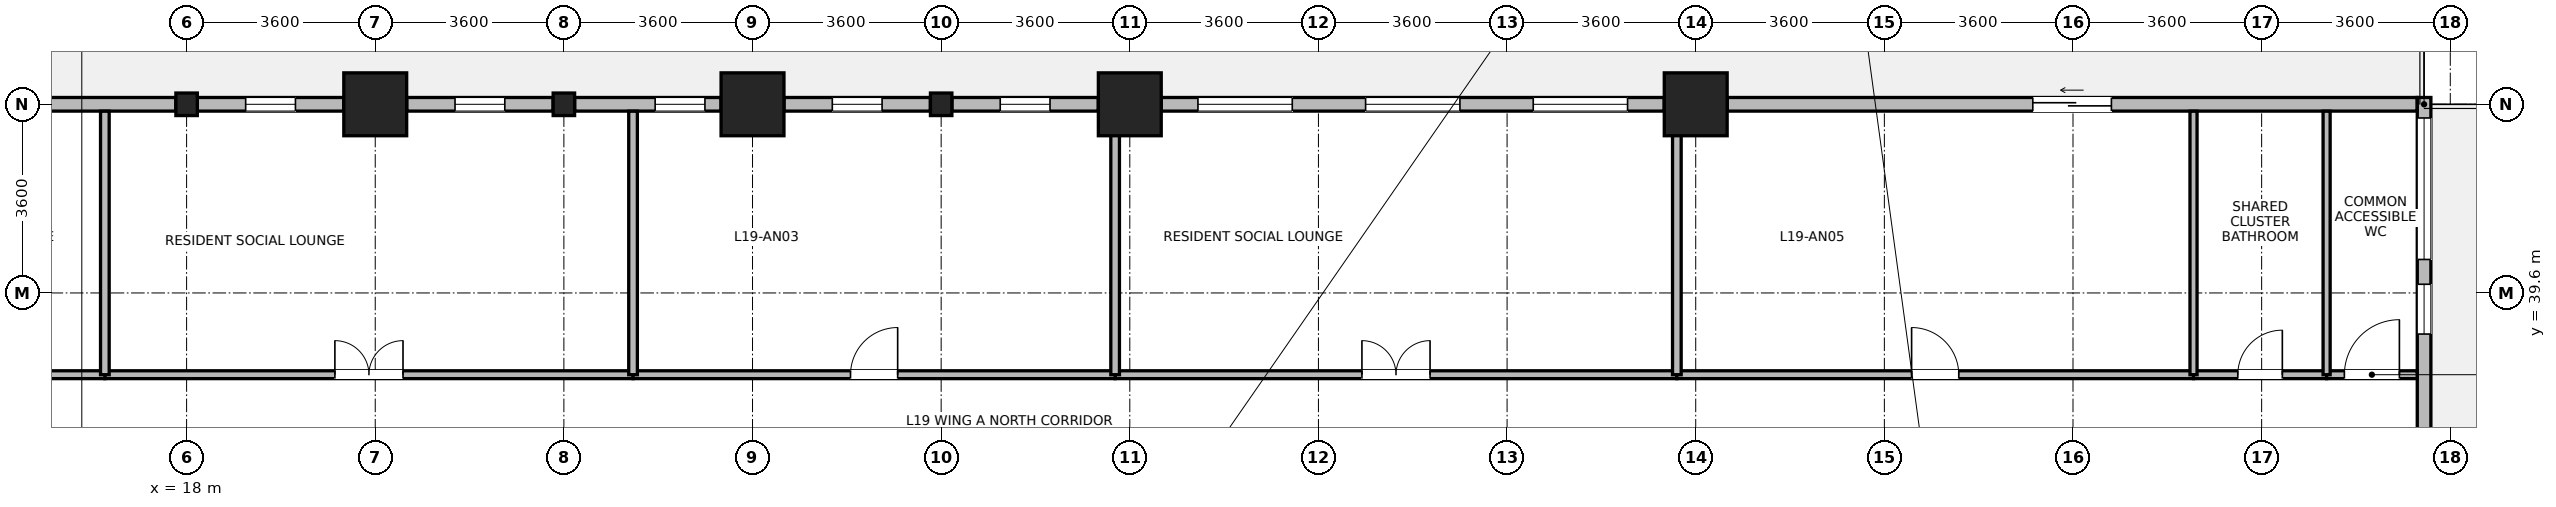
"""IFC4 building model, lengths in metres.
Left out: names, types, materials, properties, quantities, classifications, styles, units other than length and angle.
Written with IfcOpenShell. Run it as: python <this file> out.ifc"""

import sys

from ifc_helpers import new_model, si_unit, direction, frame, frame_2d, origin, origin_2d, place, context, subcontext, project, spatial, rectangle, i_section, extrude, source, transform, mapped, element, fill, save


model = new_model("IFC4")
c1 = context("Model", 3, precision=1e-05, world=origin(), true_north=direction((0.0, 1.0)))
c2 = subcontext(c1, "Body", "Model", "MODEL_VIEW")
j1 = project(units=[si_unit("LENGTHUNIT", "METRE"), si_unit("PLANEANGLEUNIT", "RADIAN")], contexts=[c1])
p1 = place(None, origin())
s1 = spatial("IfcSite", under=j1, at=p1, CompositionType="ELEMENT")
p2 = place(p1, origin())
s2 = spatial("IfcBuilding", under=s1, at=p2, CompositionType="ELEMENT")
p3 = place(p2, frame((0.0, 0.0, 78.6)))
s3 = spatial("IfcBuildingStorey", under=s2, at=p3, CompositionType="ELEMENT", Elevation=78.6)
m1 = source(origin(), c2, "Body", "SweptSolid", [
    extrude(rectangle(XDim=1.2, YDim=1.2, at=origin_2d()), origin(), (0.0, 0.0, 1.0), 3.7),
])
for number, where, z_axis, x_axis in (
    (1, (21.6, 43.2, 0.0), (0.0, 0.0, 1.0), (1.0, 0.0, 0.0)),
    (2, (28.8, 43.2, 0.0), (0.0, 0.0, 1.0), (1.0, 0.0, 0.0)),
    (3, (36.0, 43.2, 0.0), (0.0, 0.0, 1.0), (1.0, 0.0, 0.0)),
    (4, (46.8, 43.2, 0.0), (0.0, 0.0, 1.0), (1.0, 0.0, 0.0)),
):
    element("IfcColumn", number, at=place(p3, frame(where, z_axis=z_axis, x_axis=x_axis)), inside=s3, PredefinedType="COLUMN", context=c2, shape_type="MappedRepresentation", body=[
        mapped(m1, transform((0.0, 0.0, 0.0), x_axis=(1.0, 0.0, 0.0), y_axis=(0.0, 1.0, 0.0), z_axis=(0.0, 0.0, 1.0), scale=1.0)),
    ])
m2 = source(origin(), c2, "Body", "SweptSolid", [
    extrude(i_section(OverallWidth=0.409, OverallDepth=0.43, WebThickness=0.024, FlangeThickness=0.033, FilletRadius=0.015, at=origin_2d()), origin(), (0.0, 0.0, 1.0), 3.7),
])
for number, where, z_axis, x_axis in (
    (5, (18.0, 43.2, 0.0), (0.0, 0.0, 1.0), (1.0, 0.0, 0.0)),
    (6, (25.2, 43.2, 0.0), (0.0, 0.0, 1.0), (1.0, 0.0, 0.0)),
    (7, (32.4, 43.2, 0.0), (0.0, 0.0, 1.0), (1.0, 0.0, 0.0)),
):
    element("IfcColumn", number, at=place(p3, frame(where, z_axis=z_axis, x_axis=x_axis)), inside=s3, PredefinedType="COLUMN", context=c2, shape_type="MappedRepresentation", body=[
        mapped(m2, transform((0.0, 0.0, 0.0), x_axis=(1.0, 0.0, 0.0), y_axis=(0.0, 1.0, 0.0), z_axis=(0.0, 0.0, 1.0), scale=1.0)),
    ])
p4 = place(p3, frame((60.7, 43.33, 0.0), z_axis=(0.0, 0.0, 1.0), x_axis=(0.0, -1.0, 0.0)))
e8 = element("IfcWall", 8, at=p4, inside=s3, PredefinedType="STANDARD", context=c2, shape_type="SweptSolid", body=[
    extrude(rectangle(XDim=6.964, YDim=0.26, at=frame_2d((3.482, 0.0))), origin(), (0.0, 0.0, 1.0), 3.43),
])
p5 = place(p4, frame((0.391, 0.0, 0.85)))
e9 = element("IfcOpeningElement", 9, at=p5, cuts=e8, PredefinedType="OPENING", context=c2, shape_type="SweptSolid", body=[
    extrude(rectangle(XDim=2.7, YDim=2.05, at=frame_2d((1.35, 1.025))), frame((0.0, 0.14, 0.0), z_axis=(0.0, -1.0, 0.0), x_axis=(1.0, 0.0, 0.0)), (0.0, 0.0, 1.0), 0.28),
])
p6 = place(p4, frame((3.564, 0.0, 0.85)))
e10 = element("IfcOpeningElement", 10, at=p6, cuts=e8, PredefinedType="OPENING", context=c2, shape_type="SweptSolid", body=[
    extrude(rectangle(XDim=0.95, YDim=1.75, at=frame_2d((0.475, 0.875))), frame((0.0, 0.14, 0.0), z_axis=(0.0, -1.0, 0.0), x_axis=(1.0, 0.0, 0.0)), (0.0, 0.0, 1.0), 0.28),
])
p7 = place(p3, frame((47.401, 43.2, 0.0), z_axis=(0.0, 0.0, 1.0), x_axis=(1.0, 0.0, 0.0)))
e11 = element("IfcWall", 11, at=p7, inside=s3, PredefinedType="STANDARD", context=c2, shape_type="SweptSolid", body=[
    extrude(rectangle(XDim=13.164, YDim=0.26, at=frame_2d((6.582, 0.0))), origin(), (0.0, 0.0, 1.0), 3.43),
])
p8 = place(p7, frame((5.832, 0.0, 0.0)))
e12 = element("IfcOpeningElement", 12, at=p8, cuts=e11, PredefinedType="OPENING", context=c2, shape_type="SweptSolid", body=[
    extrude(rectangle(XDim=1.5, YDim=2.15, at=frame_2d((0.75, 1.075))), frame((0.0, 0.14, 0.0), z_axis=(0.0, -1.0, 0.0), x_axis=(1.0, 0.0, 0.0)), (0.0, 0.0, 1.0), 0.28),
])
p9 = place(p3, frame((36.601, 43.2, 0.0), z_axis=(0.0, 0.0, 1.0), x_axis=(1.0, 0.0, 0.0)))
e13 = element("IfcWall", 13, at=p9, inside=s3, PredefinedType="STANDARD", context=c2, shape_type="SweptSolid", body=[
    extrude(rectangle(XDim=9.598, YDim=0.26, at=frame_2d((4.799, 0.0))), origin(), (0.0, 0.0, 1.0), 2.93),
])
p10 = place(p9, frame((0.7, 0.0, 0.85)))
e14 = element("IfcOpeningElement", 14, at=p10, cuts=e13, PredefinedType="OPENING", context=c2, shape_type="SweptSolid", body=[
    extrude(rectangle(XDim=1.8, YDim=1.85, at=frame_2d((0.9, 0.925))), frame((0.0, 0.14, 0.0), z_axis=(0.0, -1.0, 0.0), x_axis=(1.0, 0.0, 0.0)), (0.0, 0.0, 1.0), 0.28),
])
p11 = place(p9, frame((3.899, 0.0, 0.85)))
e15 = element("IfcOpeningElement", 15, at=p11, cuts=e13, PredefinedType="OPENING", context=c2, shape_type="SweptSolid", body=[
    extrude(rectangle(XDim=1.8, YDim=1.85, at=frame_2d((0.9, 0.925))), frame((0.0, 0.14, 0.0), z_axis=(0.0, -1.0, 0.0), x_axis=(1.0, 0.0, 0.0)), (0.0, 0.0, 1.0), 0.28),
])
p12 = place(p9, frame((7.098, 0.0, 0.85)))
e16 = element("IfcOpeningElement", 16, at=p12, cuts=e13, PredefinedType="OPENING", context=c2, shape_type="SweptSolid", body=[
    extrude(rectangle(XDim=1.8, YDim=1.85, at=frame_2d((0.9, 0.925))), frame((0.0, 0.14, 0.0), z_axis=(0.0, -1.0, 0.0), x_axis=(1.0, 0.0, 0.0)), (0.0, 0.0, 1.0), 0.28),
])
p13 = place(p3, frame((32.605, 43.2, 0.0), z_axis=(0.0, 0.0, 1.0), x_axis=(1.0, 0.0, 0.0)))
e17 = element("IfcWall", 17, at=p13, inside=s3, PredefinedType="STANDARD", context=c2, shape_type="SweptSolid", body=[
    extrude(rectangle(XDim=2.793, YDim=0.26, at=frame_2d((1.397, 0.0))), origin(), (0.0, 0.0, 1.0), 2.93),
])
p14 = place(p13, frame((0.922, 0.0, 0.85)))
e18 = element("IfcOpeningElement", 18, at=p14, cuts=e17, PredefinedType="OPENING", context=c2, shape_type="SweptSolid", body=[
    extrude(rectangle(XDim=0.95, YDim=1.75, at=frame_2d((0.475, 0.875))), frame((0.0, 0.14, 0.0), z_axis=(0.0, -1.0, 0.0), x_axis=(1.0, 0.0, 0.0)), (0.0, 0.0, 1.0), 0.28),
])
p15 = place(p3, frame((29.401, 43.2, 0.0), z_axis=(0.0, 0.0, 1.0), x_axis=(1.0, 0.0, 0.0)))
e19 = element("IfcWall", 19, at=p15, inside=s3, PredefinedType="STANDARD", context=c2, shape_type="SweptSolid", body=[
    extrude(rectangle(XDim=2.794, YDim=0.26, at=frame_2d((1.397, 0.0))), origin(), (0.0, 0.0, 1.0), 2.93),
])
p16 = place(p15, frame((0.922, 0.0, 0.85)))
e20 = element("IfcOpeningElement", 20, at=p16, cuts=e19, PredefinedType="OPENING", context=c2, shape_type="SweptSolid", body=[
    extrude(rectangle(XDim=0.95, YDim=1.75, at=frame_2d((0.475, 0.875))), frame((0.0, 0.14, 0.0), z_axis=(0.0, -1.0, 0.0), x_axis=(1.0, 0.0, 0.0)), (0.0, 0.0, 1.0), 0.28),
])
p17 = place(p3, frame((25.406, 43.2, 0.0), z_axis=(0.0, 0.0, 1.0), x_axis=(1.0, 0.0, 0.0)))
e21 = element("IfcWall", 21, at=p17, inside=s3, PredefinedType="STANDARD", context=c2, shape_type="SweptSolid", body=[
    extrude(rectangle(XDim=2.793, YDim=0.26, at=frame_2d((1.397, 0.0))), origin(), (0.0, 0.0, 1.0), 2.93),
])
p18 = place(p17, frame((1.536, 0.0, 0.85)))
e22 = element("IfcOpeningElement", 22, at=p18, cuts=e21, PredefinedType="OPENING", context=c2, shape_type="SweptSolid", body=[
    extrude(rectangle(XDim=0.95, YDim=1.75, at=frame_2d((0.475, 0.875))), frame((0.0, 0.14, 0.0), z_axis=(0.0, -1.0, 0.0), x_axis=(1.0, 0.0, 0.0)), (0.0, 0.0, 1.0), 0.28),
])
p19 = place(p3, frame((22.201, 43.2, 0.0), z_axis=(0.0, 0.0, 1.0), x_axis=(1.0, 0.0, 0.0)))
e23 = element("IfcWall", 23, at=p19, inside=s3, PredefinedType="STANDARD", context=c2, shape_type="SweptSolid", body=[
    extrude(rectangle(XDim=2.793, YDim=0.26, at=frame_2d((1.397, 0.0))), origin(), (0.0, 0.0, 1.0), 2.93),
])
p20 = place(p19, frame((0.922, 0.0, 0.85)))
e24 = element("IfcOpeningElement", 24, at=p20, cuts=e23, PredefinedType="OPENING", context=c2, shape_type="SweptSolid", body=[
    extrude(rectangle(XDim=0.95, YDim=1.75, at=frame_2d((0.475, 0.875))), frame((0.0, 0.14, 0.0), z_axis=(0.0, -1.0, 0.0), x_axis=(1.0, 0.0, 0.0)), (0.0, 0.0, 1.0), 0.28),
])
p21 = place(p3, frame((18.206, 43.2, 0.0), z_axis=(0.0, 0.0, 1.0), x_axis=(1.0, 0.0, 0.0)))
e25 = element("IfcWall", 25, at=p21, inside=s3, PredefinedType="STANDARD", context=c2, shape_type="SweptSolid", body=[
    extrude(rectangle(XDim=2.793, YDim=0.26, at=frame_2d((1.397, 0.0))), origin(), (0.0, 0.0, 1.0), 2.93),
])
p22 = place(p21, frame((0.922, 0.0, 0.85)))
e26 = element("IfcOpeningElement", 26, at=p22, cuts=e25, PredefinedType="OPENING", context=c2, shape_type="SweptSolid", body=[
    extrude(rectangle(XDim=0.95, YDim=1.75, at=frame_2d((0.475, 0.875))), frame((0.0, 0.14, 0.0), z_axis=(0.0, -1.0, 0.0), x_axis=(1.0, 0.0, 0.0)), (0.0, 0.0, 1.0), 0.28),
])
p23 = place(p3, frame((15.001, 43.2, 0.0), z_axis=(0.0, 0.0, 1.0), x_axis=(1.0, 0.0, 0.0)))
e27 = element("IfcWall", 27, at=p23, inside=s3, PredefinedType="STANDARD", context=c2, shape_type="SweptSolid", body=[
    extrude(rectangle(XDim=2.793, YDim=0.26, at=frame_2d((1.397, 0.0))), origin(), (0.0, 0.0, 1.0), 2.93),
])
p24 = place(p3, frame((35.72, 38.04, 0.0), z_axis=(0.0, 0.0, 1.0), x_axis=(1.0, 0.0, 0.0)))
e28 = element("IfcWall", 28, at=p24, inside=s3, PredefinedType="PARTITIONING", context=c2, shape_type="SweptSolid", body=[
    extrude(rectangle(XDim=10.72, YDim=0.15, at=frame_2d((5.36, 0.0))), origin(), (0.0, 0.0, 1.0), 3.43),
])
p25 = place(p24, frame((4.71, 0.0, 0.0)))
e29 = element("IfcOpeningElement", 29, at=p25, cuts=e28, PredefinedType="OPENING", context=c2, shape_type="SweptSolid", body=[
    extrude(rectangle(XDim=1.3, YDim=2.12, at=frame_2d((0.65, 1.06))), frame((0.0, 0.085, 0.0), z_axis=(0.0, -1.0, 0.0), x_axis=(1.0, 0.0, 0.0)), (0.0, 0.0, 1.0), 0.17),
])
p26 = place(p3, frame((16.44, 38.04, 0.0), z_axis=(0.0, 0.0, 1.0), x_axis=(1.0, 0.0, 0.0)))
e30 = element("IfcWall", 30, at=p26, inside=s3, PredefinedType="PARTITIONING", context=c2, shape_type="SweptSolid", body=[
    extrude(rectangle(XDim=10.08, YDim=0.15, at=frame_2d((5.04, 0.0))), origin(), (0.0, 0.0, 1.0), 3.43),
])
p27 = place(p26, frame((4.39, 0.0, 0.0)))
e31 = element("IfcOpeningElement", 31, at=p27, cuts=e30, PredefinedType="OPENING", context=c2, shape_type="SweptSolid", body=[
    extrude(rectangle(XDim=1.3, YDim=2.12, at=frame_2d((0.65, 1.06))), frame((0.0, 0.085, 0.0), z_axis=(0.0, -1.0, 0.0), x_axis=(1.0, 0.0, 0.0)), (0.0, 0.0, 1.0), 0.17),
])
p28 = place(p3, frame((46.44, 38.04, 0.0), z_axis=(0.0, 0.0, 1.0), x_axis=(1.0, 0.0, 0.0)))
e32 = element("IfcWall", 32, at=p28, inside=s3, PredefinedType="PARTITIONING", context=c2, shape_type="SweptSolid", body=[
    extrude(rectangle(XDim=9.86, YDim=0.15, at=frame_2d((4.93, 0.0))), origin(), (0.0, 0.0, 1.0), 3.43),
])
p29 = place(p28, frame((4.48, 0.0, 0.0)))
e33 = element("IfcOpeningElement", 33, at=p29, cuts=e32, PredefinedType="OPENING", context=c2, shape_type="SweptSolid", body=[
    extrude(rectangle(XDim=0.9, YDim=2.08, at=frame_2d((0.45, 1.04))), frame((0.0, 0.085, 0.0), z_axis=(0.0, -1.0, 0.0), x_axis=(1.0, 0.0, 0.0)), (0.0, 0.0, 1.0), 0.17),
])
p30 = place(p3, frame((6.832, 38.04, 0.0), z_axis=(0.0, 0.0, 1.0), x_axis=(1.0, 0.0, 0.0)))
e34 = element("IfcWall", 34, at=p30, inside=s3, PredefinedType="PARTITIONING", context=c2, shape_type="SweptSolid", body=[
    extrude(rectangle(XDim=9.608, YDim=0.15, at=frame_2d((4.804, 0.0))), origin(), (0.0, 0.0, 1.0), 3.43),
])
p31 = place(p30, frame((4.154, 0.0, 0.0)))
e35 = element("IfcOpeningElement", 35, at=p31, cuts=e34, PredefinedType="OPENING", context=c2, shape_type="SweptSolid", body=[
    extrude(rectangle(XDim=1.3, YDim=2.12, at=frame_2d((0.65, 1.06))), frame((0.0, 0.085, 0.0), z_axis=(0.0, -1.0, 0.0), x_axis=(1.0, 0.0, 0.0)), (0.0, 0.0, 1.0), 0.17),
])
p32 = place(p3, frame((26.52, 38.04, 0.0), z_axis=(0.0, 0.0, 1.0), x_axis=(1.0, 0.0, 0.0)))
e36 = element("IfcWall", 36, at=p32, inside=s3, PredefinedType="PARTITIONING", context=c2, shape_type="SweptSolid", body=[
    extrude(rectangle(XDim=9.2, YDim=0.15, at=frame_2d((4.6, 0.0))), origin(), (0.0, 0.0, 1.0), 3.43),
])
p33 = place(p32, frame((4.15, 0.0, 0.0)))
e37 = element("IfcOpeningElement", 37, at=p33, cuts=e36, PredefinedType="OPENING", context=c2, shape_type="SweptSolid", body=[
    extrude(rectangle(XDim=0.9, YDim=2.08, at=frame_2d((0.45, 1.04))), frame((0.0, 0.085, 0.0), z_axis=(0.0, -1.0, 0.0), x_axis=(1.0, 0.0, 0.0)), (0.0, 0.0, 1.0), 0.17),
])
p34 = place(p3, frame((56.3, 38.04, 0.0), z_axis=(0.0, 0.0, 1.0), x_axis=(1.0, 0.0, 0.0)))
e38 = element("IfcWall", 38, at=p34, inside=s3, PredefinedType="PARTITIONING", context=c2, shape_type="SweptSolid", body=[
    extrude(rectangle(XDim=2.54, YDim=0.15, at=frame_2d((1.27, 0.0))), origin(), (0.0, 0.0, 1.0), 3.43),
])
p35 = place(p34, frame((0.845, 0.0, 0.0)))
e39 = element("IfcOpeningElement", 39, at=p35, cuts=e38, PredefinedType="OPENING", context=c2, shape_type="SweptSolid", body=[
    extrude(rectangle(XDim=0.85, YDim=2.04, at=frame_2d((0.425, 1.02))), frame((0.0, 0.085, 0.0), z_axis=(0.0, -1.0, 0.0), x_axis=(1.0, 0.0, 0.0)), (0.0, 0.0, 1.0), 0.17),
])
p36 = place(p3, frame((58.84, 38.04, 0.0), z_axis=(0.0, 0.0, 1.0), x_axis=(1.0, 0.0, 0.0)))
e40 = element("IfcWall", 40, at=p36, inside=s3, PredefinedType="PARTITIONING", context=c2, shape_type="SweptSolid", body=[
    extrude(rectangle(XDim=1.728, YDim=0.15, at=frame_2d((0.864, 0.0))), origin(), (0.0, 0.0, 1.0), 3.43),
])
p37 = place(p36, frame((0.339, 0.0, 0.0)))
e41 = element("IfcOpeningElement", 41, at=p37, cuts=e40, PredefinedType="OPENING", context=c2, shape_type="SweptSolid", body=[
    extrude(rectangle(XDim=1.05, YDim=2.12, at=frame_2d((0.525, 1.06))), frame((0.0, 0.085, 0.0), z_axis=(0.0, -1.0, 0.0), x_axis=(1.0, 0.0, 0.0)), (0.0, 0.0, 1.0), 0.17),
])
for number, where, z_axis, x_axis in (
    (42, (16.44, 38.04, 0.0), (0.0, 0.0, 1.0), (0.0, 1.0, 0.0)),
    (43, (26.52, 38.04, 0.0), (0.0, 0.0, 1.0), (0.0, 1.0, 0.0)),
    (44, (35.72, 38.04, 0.0), (0.0, 0.0, 1.0), (0.0, 1.0, 0.0)),
    (45, (46.44, 38.04, 0.0), (0.0, 0.0, 1.0), (0.0, 1.0, 0.0)),
):
    element("IfcWall", number, at=place(p3, frame(where, z_axis=z_axis, x_axis=x_axis)), inside=s3, PredefinedType="PARTITIONING", context=c2, shape_type="SweptSolid", body=[
        extrude(rectangle(XDim=5.028, YDim=0.165, at=frame_2d((2.514, 0.0))), origin(), (0.0, 0.0, 1.0), 3.43),
    ])
for number, where, z_axis, x_axis in (
    (46, (56.3, 38.04, 0.0), (0.0, 0.0, 1.0), (0.0, 1.0, 0.0)),
    (47, (58.84, 38.04, 0.0), (0.0, 0.0, 1.0), (0.0, 1.0, 0.0)),
):
    element("IfcWall", number, at=place(p3, frame(where, z_axis=z_axis, x_axis=x_axis)), inside=s3, PredefinedType="PARTITIONING", context=c2, shape_type="SweptSolid", body=[
        extrude(rectangle(XDim=5.028, YDim=0.135, at=frame_2d((2.514, 0.0))), origin(), (0.0, 0.0, 1.0), 3.43),
    ])
p38 = place(p5, origin())
e48 = element("IfcWindow", 48, at=p38, inside=s3, PartitioningType="SINGLE_PANEL", PredefinedType="WINDOW", context=c2, shape_type="SweptSolid", body=[
    extrude(rectangle(XDim=2.7, YDim=2.05, at=frame_2d((1.35, 1.025))), frame((0.0, 0.03, 0.0), z_axis=(0.0, -1.0, 0.0), x_axis=(1.0, 0.0, 0.0)), (0.0, 0.0, 1.0), 0.06),
])
fill(e9, e48)
p39 = place(p6, origin())
e49 = element("IfcWindow", 49, at=p39, inside=s3, PartitioningType="SINGLE_PANEL", PredefinedType="WINDOW", context=c2, shape_type="SweptSolid", body=[
    extrude(rectangle(XDim=0.95, YDim=1.75, at=frame_2d((0.475, 0.875))), frame((0.0, 0.03, 0.0), z_axis=(0.0, -1.0, 0.0), x_axis=(1.0, 0.0, 0.0)), (0.0, 0.0, 1.0), 0.06),
])
fill(e10, e49)
p40 = place(p8, origin())
e50 = element("IfcDoor", 50, at=p40, inside=s3, OperationType="SLIDING_TO_LEFT", PredefinedType="DOOR", context=c2, shape_type="SweptSolid", body=[
    extrude(rectangle(XDim=1.5, YDim=2.15, at=frame_2d((0.75, 1.075))), frame((0.0, 0.025, 0.0), z_axis=(0.0, -1.0, 0.0), x_axis=(1.0, 0.0, 0.0)), (0.0, 0.0, 1.0), 0.05),
])
fill(e12, e50)
p41 = place(p10, origin())
e51 = element("IfcWindow", 51, at=p41, inside=s3, PartitioningType="SINGLE_PANEL", PredefinedType="WINDOW", context=c2, shape_type="SweptSolid", body=[
    extrude(rectangle(XDim=1.8, YDim=1.85, at=frame_2d((0.9, 0.925))), frame((0.0, 0.03, 0.0), z_axis=(0.0, -1.0, 0.0), x_axis=(1.0, 0.0, 0.0)), (0.0, 0.0, 1.0), 0.06),
])
fill(e14, e51)
p42 = place(p11, origin())
e52 = element("IfcWindow", 52, at=p42, inside=s3, PartitioningType="SINGLE_PANEL", PredefinedType="WINDOW", context=c2, shape_type="SweptSolid", body=[
    extrude(rectangle(XDim=1.8, YDim=1.85, at=frame_2d((0.9, 0.925))), frame((0.0, 0.03, 0.0), z_axis=(0.0, -1.0, 0.0), x_axis=(1.0, 0.0, 0.0)), (0.0, 0.0, 1.0), 0.06),
])
fill(e15, e52)
p43 = place(p12, origin())
e53 = element("IfcWindow", 53, at=p43, inside=s3, PartitioningType="SINGLE_PANEL", PredefinedType="WINDOW", context=c2, shape_type="SweptSolid", body=[
    extrude(rectangle(XDim=1.8, YDim=1.85, at=frame_2d((0.9, 0.925))), frame((0.0, 0.03, 0.0), z_axis=(0.0, -1.0, 0.0), x_axis=(1.0, 0.0, 0.0)), (0.0, 0.0, 1.0), 0.06),
])
fill(e16, e53)
p44 = place(p14, origin())
e54 = element("IfcWindow", 54, at=p44, inside=s3, PartitioningType="SINGLE_PANEL", PredefinedType="WINDOW", context=c2, shape_type="SweptSolid", body=[
    extrude(rectangle(XDim=0.95, YDim=1.75, at=frame_2d((0.475, 0.875))), frame((0.0, 0.03, 0.0), z_axis=(0.0, -1.0, 0.0), x_axis=(1.0, 0.0, 0.0)), (0.0, 0.0, 1.0), 0.06),
])
fill(e18, e54)
p45 = place(p16, origin())
e55 = element("IfcWindow", 55, at=p45, inside=s3, PartitioningType="SINGLE_PANEL", PredefinedType="WINDOW", context=c2, shape_type="SweptSolid", body=[
    extrude(rectangle(XDim=0.95, YDim=1.75, at=frame_2d((0.475, 0.875))), frame((0.0, 0.03, 0.0), z_axis=(0.0, -1.0, 0.0), x_axis=(1.0, 0.0, 0.0)), (0.0, 0.0, 1.0), 0.06),
])
fill(e20, e55)
p46 = place(p18, origin())
e56 = element("IfcWindow", 56, at=p46, inside=s3, PartitioningType="SINGLE_PANEL", PredefinedType="WINDOW", context=c2, shape_type="SweptSolid", body=[
    extrude(rectangle(XDim=0.95, YDim=1.75, at=frame_2d((0.475, 0.875))), frame((0.0, 0.03, 0.0), z_axis=(0.0, -1.0, 0.0), x_axis=(1.0, 0.0, 0.0)), (0.0, 0.0, 1.0), 0.06),
])
fill(e22, e56)
p47 = place(p20, origin())
e57 = element("IfcWindow", 57, at=p47, inside=s3, PartitioningType="SINGLE_PANEL", PredefinedType="WINDOW", context=c2, shape_type="SweptSolid", body=[
    extrude(rectangle(XDim=0.95, YDim=1.75, at=frame_2d((0.475, 0.875))), frame((0.0, 0.03, 0.0), z_axis=(0.0, -1.0, 0.0), x_axis=(1.0, 0.0, 0.0)), (0.0, 0.0, 1.0), 0.06),
])
fill(e24, e57)
p48 = place(p22, origin())
e58 = element("IfcWindow", 58, at=p48, inside=s3, PartitioningType="SINGLE_PANEL", PredefinedType="WINDOW", context=c2, shape_type="SweptSolid", body=[
    extrude(rectangle(XDim=0.95, YDim=1.75, at=frame_2d((0.475, 0.875))), frame((0.0, 0.03, 0.0), z_axis=(0.0, -1.0, 0.0), x_axis=(1.0, 0.0, 0.0)), (0.0, 0.0, 1.0), 0.06),
])
fill(e26, e58)
p49 = place(p25, origin())
e59 = element("IfcDoor", 59, at=p49, inside=s3, OperationType="DOUBLE_DOOR_SINGLE_SWING", PredefinedType="DOOR", context=c2, shape_type="SweptSolid", body=[
    extrude(rectangle(XDim=1.3, YDim=2.12, at=frame_2d((0.65, 1.06))), frame((0.0, 0.025, 0.0), z_axis=(0.0, -1.0, 0.0), x_axis=(1.0, 0.0, 0.0)), (0.0, 0.0, 1.0), 0.05),
])
fill(e29, e59)
p50 = place(p27, origin())
e60 = element("IfcDoor", 60, at=p50, inside=s3, OperationType="DOUBLE_DOOR_SINGLE_SWING", PredefinedType="DOOR", context=c2, shape_type="SweptSolid", body=[
    extrude(rectangle(XDim=1.3, YDim=2.12, at=frame_2d((0.65, 1.06))), frame((0.0, 0.025, 0.0), z_axis=(0.0, -1.0, 0.0), x_axis=(1.0, 0.0, 0.0)), (0.0, 0.0, 1.0), 0.05),
])
fill(e31, e60)
p51 = place(p29, origin())
e61 = element("IfcDoor", 61, at=p51, inside=s3, OperationType="SINGLE_SWING_LEFT", PredefinedType="DOOR", context=c2, shape_type="SweptSolid", body=[
    extrude(rectangle(XDim=0.9, YDim=2.08, at=frame_2d((0.45, 1.04))), frame((0.0, 0.025, 0.0), z_axis=(0.0, -1.0, 0.0), x_axis=(1.0, 0.0, 0.0)), (0.0, 0.0, 1.0), 0.05),
])
fill(e33, e61)
p52 = place(p33, origin())
e62 = element("IfcDoor", 62, at=p52, inside=s3, OperationType="SINGLE_SWING_RIGHT", PredefinedType="DOOR", context=c2, shape_type="SweptSolid", body=[
    extrude(rectangle(XDim=0.9, YDim=2.08, at=frame_2d((0.45, 1.04))), frame((0.0, 0.025, 0.0), z_axis=(0.0, -1.0, 0.0), x_axis=(1.0, 0.0, 0.0)), (0.0, 0.0, 1.0), 0.05),
])
fill(e37, e62)
p53 = place(p35, origin())
e63 = element("IfcDoor", 63, at=p53, inside=s3, OperationType="SINGLE_SWING_RIGHT", PredefinedType="DOOR", context=c2, shape_type="SweptSolid", body=[
    extrude(rectangle(XDim=0.85, YDim=2.04, at=frame_2d((0.425, 1.02))), frame((0.0, 0.025, 0.0), z_axis=(0.0, -1.0, 0.0), x_axis=(1.0, 0.0, 0.0)), (0.0, 0.0, 1.0), 0.05),
])
fill(e39, e63)
p54 = place(p37, origin())
e64 = element("IfcDoor", 64, at=p54, inside=s3, OperationType="SINGLE_SWING_RIGHT", PredefinedType="DOOR", context=c2, shape_type="SweptSolid", body=[
    extrude(rectangle(XDim=1.05, YDim=2.12, at=frame_2d((0.525, 1.06))), frame((0.0, 0.025, 0.0), z_axis=(0.0, -1.0, 0.0), x_axis=(1.0, 0.0, 0.0)), (0.0, 0.0, 1.0), 0.05),
])
fill(e41, e64)
save(model, sys.argv[1])
